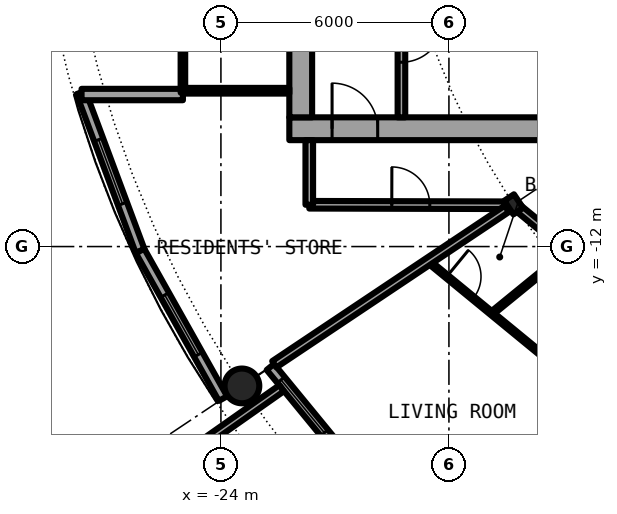
"""IFC4 building model, lengths in metres.
Left out: names, types, materials, properties, quantities, classifications, styles, units other than length and angle.
Written with IfcOpenShell. Run it as: python <this file> out.ifc"""

import sys

from ifc_helpers import new_model, si_unit, direction, frame, frame_2d, origin, origin_2d, place, context, subcontext, project, spatial, rectangle, hollow_circle, i_section, extrude, element, fill, save


model = new_model("IFC4")
c1 = context("Model", 3, precision=1e-05, world=origin(), true_north=direction((0.0, 1.0)))
c2 = subcontext(c1, "Body", "Model", "MODEL_VIEW")
j1 = project(units=[si_unit("LENGTHUNIT", "METRE"), si_unit("PLANEANGLEUNIT", "RADIAN")], contexts=[c1])
p1 = place(None, origin())
s1 = spatial("IfcSite", under=j1, at=p1, CompositionType="ELEMENT")
p2 = place(p1, origin())
s2 = spatial("IfcBuilding", under=s1, at=p2, CompositionType="ELEMENT")
p3 = place(p2, frame((0.0, 0.0, 129.95)))
s3 = spatial("IfcBuildingStorey", under=s2, at=p3, CompositionType="ELEMENT", Elevation=129.95)
p4 = place(p3, frame((-23.448, -15.667, 0.0), z_axis=(0.0, 0.0, 1.0), x_axis=(1.0, 0.0, 0.0)))
e1 = element("IfcColumn", 1, at=p4, inside=s3, PredefinedType="COLUMN", context=c2, shape_type="SweptSolid", body=[
    extrude(hollow_circle(Radius=0.457, WallThickness=0.04, at=origin_2d()), origin(), (0.0, 0.0, 1.0), 3.05),
])
p5 = place(p3, frame((-16.297, -10.889, 0.0), z_axis=(0.0, 0.0, 1.0), x_axis=(-0.831469612303, -0.55557023302, 0.0)))
e2 = element("IfcColumn", 2, at=p5, inside=s3, PredefinedType="COLUMN", context=c2, shape_type="SweptSolid", body=[
    extrude(i_section(OverallWidth=0.307, OverallDepth=0.432, WebThickness=0.021, FlangeThickness=0.04, FilletRadius=0.027, at=origin_2d()), origin(), (0.0, 0.0, 1.0), 3.05),
])
p6 = place(p3, frame((-22.699, -15.167, 0.0), z_axis=(0.0, 0.0, 1.0), x_axis=(0.634382322723, -0.773019449054, 0.0)))
e3 = element("IfcWall", 3, at=p6, inside=s3, PredefinedType="SOLIDWALL", context=c2, shape_type="SweptSolid", body=[
    extrude(rectangle(XDim=5.352, YDim=0.25, at=frame_2d((2.676, 0.0))), origin(), (0.0, 0.0, 1.0), 2.7),
])
p7 = place(p6, frame((0.441, 0.0, 0.3)))
e4 = element("IfcOpeningElement", 4, at=p7, cuts=e3, PredefinedType="OPENING", context=c2, shape_type="SweptSolid", body=[
    extrude(rectangle(XDim=1.8, YDim=2.1, at=frame_2d((0.9, 1.05))), frame((0.0, 0.135, 0.0), z_axis=(0.0, -1.0, 0.0), x_axis=(1.0, 0.0, 0.0)), (0.0, 0.0, 1.0), 0.27),
])
p8 = place(p6, frame((3.51, 0.0, 0.0)))
e5 = element("IfcOpeningElement", 5, at=p8, cuts=e3, PredefinedType="OPENING", context=c2, shape_type="SweptSolid", body=[
    extrude(rectangle(XDim=1.0, YDim=2.2, at=frame_2d((0.5, 1.1))), frame((0.0, 0.135, 0.0), z_axis=(0.0, -1.0, 0.0), x_axis=(1.0, 0.0, 0.0)), (0.0, 0.0, 1.0), 0.27),
])
p9 = place(p3, frame((-22.402, -15.726, -0.03), z_axis=(0.0, 0.0, 1.0), x_axis=(-0.818275399393, -0.574826383135, 0.0)))
e6 = element("IfcWall", 6, at=p9, inside=s3, PredefinedType="SOLIDWALL", context=c2, shape_type="SweptSolid", body=[
    extrude(rectangle(XDim=2.929, YDim=0.2, at=frame_2d((1.465, 0.0))), origin(), (0.0, 0.0, 1.0), 2.73),
])
p10 = place(p3, frame((-27.682, -7.945, 0.0), z_axis=(0.0, 0.0, 1.0), x_axis=(0.349247811493, -0.937030397675, 0.0)))
e7 = element("IfcWall", 7, at=p10, inside=s3, PredefinedType="SOLIDWALL", context=c2, shape_type="SweptSolid", body=[
    extrude(rectangle(XDim=4.452, YDim=0.25, at=frame_2d((2.226, 0.0))), origin(), (0.0, 0.0, 1.0), 2.7),
])
p11 = place(p10, frame((1.327, 0.0, 0.3)))
e8 = element("IfcOpeningElement", 8, at=p11, cuts=e7, PredefinedType="OPENING", context=c2, shape_type="SweptSolid", body=[
    extrude(rectangle(XDim=1.8, YDim=2.1, at=frame_2d((0.9, 1.05))), frame((0.0, 0.135, 0.0), z_axis=(0.0, -1.0, 0.0), x_axis=(1.0, 0.0, 0.0)), (0.0, 0.0, 1.0), 0.27),
])
p12 = place(p3, frame((-26.127, -12.117, 0.0), z_axis=(0.0, 0.0, 1.0), x_axis=(0.489696356642, -0.871893042919, 0.0)))
e9 = element("IfcWall", 9, at=p12, inside=s3, PredefinedType="SOLIDWALL", context=c2, shape_type="SweptSolid", body=[
    extrude(rectangle(XDim=4.454, YDim=0.25, at=frame_2d((2.227, 0.0))), origin(), (0.0, 0.0, 1.0), 2.7),
])
p13 = place(p12, frame((1.327, 0.0, 0.3)))
e10 = element("IfcOpeningElement", 10, at=p13, cuts=e9, PredefinedType="OPENING", context=c2, shape_type="SweptSolid", body=[
    extrude(rectangle(XDim=1.8, YDim=2.1, at=frame_2d((0.9, 1.05))), frame((0.0, 0.135, 0.0), z_axis=(0.0, -1.0, 0.0), x_axis=(1.0, 0.0, 0.0)), (0.0, 0.0, 1.0), 0.27),
])
p14 = place(p3, frame((-25.0, -8.0, 0.0), z_axis=(0.0, 0.0, 1.0), x_axis=(-1.0, 0.0, 0.0)))
e11 = element("IfcWall", 11, at=p14, inside=s3, PredefinedType="SOLIDWALL", context=c2, shape_type="SweptSolid", body=[
    extrude(rectangle(XDim=2.667, YDim=0.3, at=frame_2d((1.333, 0.0))), origin(), (0.0, 0.0, 1.0), 2.7),
])
p15 = place(p3, frame((-22.2, -8.9, 0.0), z_axis=(0.0, 0.0, 1.0), x_axis=(1.0, 0.0, 0.0)))
e12 = element("IfcWall", 12, at=p15, inside=s3, PredefinedType="SHEAR", context=c2, shape_type="SweptSolid", body=[
    extrude(rectangle(XDim=13.8, YDim=0.6, at=frame_2d((6.9, 0.0))), origin(), (0.0, 0.0, 1.0), 3.05),
])
p16 = place(p15, frame((1.125, 0.0, 0.0)))
e13 = element("IfcOpeningElement", 13, at=p16, cuts=e12, PredefinedType="OPENING", context=c2, shape_type="SweptSolid", body=[
    extrude(rectangle(XDim=1.2, YDim=2.3, at=frame_2d((0.6, 1.15))), frame((0.0, 0.31, 0.0), z_axis=(0.0, -1.0, 0.0), x_axis=(1.0, 0.0, 0.0)), (0.0, 0.0, 1.0), 0.62),
])
p17 = place(p3, frame((-21.9, -8.6, 0.0), z_axis=(0.0, 0.0, 1.0), x_axis=(0.0, 1.0, 0.0)))
e14 = element("IfcWall", 14, at=p17, inside=s3, PredefinedType="SHEAR", context=c2, shape_type="SweptSolid", body=[
    extrude(rectangle(XDim=17.2, YDim=0.6, at=frame_2d((8.6, 0.0))), origin(), (0.0, 0.0, 1.0), 3.05),
])
p18 = place(p17, frame((7.7, 0.0, 0.0)))
e15 = element("IfcOpeningElement", 15, at=p18, cuts=e14, PredefinedType="OPENING", context=c2, shape_type="SweptSolid", body=[
    extrude(rectangle(XDim=1.8, YDim=2.3, at=frame_2d((0.9, 1.15))), frame((0.0, 0.31, 0.0), z_axis=(0.0, -1.0, 0.0), x_axis=(1.0, 0.0, 0.0)), (0.0, 0.0, 1.0), 0.62),
])
p19 = place(p3, frame((-19.25, -1.575, 0.0), z_axis=(0.0, 0.0, 1.0), x_axis=(0.0, -1.0, 0.0)))
e16 = element("IfcWall", 16, at=p19, inside=s3, PredefinedType="SOLIDWALL", context=c2, shape_type="SweptSolid", body=[
    extrude(rectangle(XDim=7.025, YDim=0.2, at=frame_2d((3.513, 0.0))), origin(), (0.0, 0.0, 1.0), 2.7),
])
p20 = place(p19, frame((4.475, 0.0, 0.0)))
e17 = element("IfcOpeningElement", 17, at=p20, cuts=e16, PredefinedType="OPENING", context=c2, shape_type="SweptSolid", body=[
    extrude(rectangle(XDim=1.1, YDim=2.3, at=frame_2d((0.55, 1.15))), frame((0.0, 0.11, 0.0), z_axis=(0.0, -1.0, 0.0), x_axis=(1.0, 0.0, 0.0)), (0.0, 0.0, 1.0), 0.22),
])
p21 = place(p3, frame((-22.2, -7.9, 0.0), z_axis=(0.0, 0.0, 1.0), x_axis=(-1.0, 0.0, 0.0)))
e18 = element("IfcWall", 18, at=p21, inside=s3, PredefinedType="PARTITIONING", context=c2, shape_type="SweptSolid", body=[
    extrude(rectangle(XDim=2.74, YDim=0.15, at=frame_2d((1.37, 0.0))), origin(), (0.0, 0.0, 1.0), 2.7),
])
p22 = place(p3, frame((-25.0, 7.95, 0.0), z_axis=(0.0, 0.0, 1.0), x_axis=(0.0, -1.0, 0.0)))
e19 = element("IfcWall", 19, at=p22, inside=s3, PredefinedType="PARTITIONING", context=c2, shape_type="SweptSolid", body=[
    extrude(rectangle(XDim=15.9, YDim=0.12, at=frame_2d((7.95, 0.0))), origin(), (0.0, 0.0, 1.0), 2.7),
])
p23 = place(p22, frame((0.95, 0.0, 0.1)))
e20 = element("IfcOpeningElement", 20, at=p23, cuts=e19, PredefinedType="OPENING", context=c2, shape_type="SweptSolid", body=[
    extrude(rectangle(XDim=14.0, YDim=2.35, at=frame_2d((7.0, 1.175))), frame((0.0, 0.07, 0.0), z_axis=(0.0, -1.0, 0.0), x_axis=(1.0, 0.0, 0.0)), (0.0, 0.0, 1.0), 0.14),
])
p24 = place(p3, frame((-18.542, -12.389, 0.0), z_axis=(0.0, 0.0, 1.0), x_axis=(0.772975913823, -0.634435368379, 0.0)))
e21 = element("IfcWall", 21, at=p24, inside=s3, PredefinedType="PARTITIONING", context=c2, shape_type="SweptSolid", body=[
    extrude(rectangle(XDim=4.316, YDim=0.1, at=frame_2d((2.158, 0.0))), origin(), (0.0, 0.0, 1.0), 2.7),
])
p25 = place(p24, frame((0.629, 0.0, 0.0)))
e22 = element("IfcOpeningElement", 22, at=p25, cuts=e21, PredefinedType="OPENING", context=c2, shape_type="SweptSolid", body=[
    extrude(rectangle(XDim=0.9, YDim=2.3, at=frame_2d((0.45, 1.15))), frame((0.0, 0.06, 0.0), z_axis=(0.0, -1.0, 0.0), x_axis=(1.0, 0.0, 0.0)), (0.0, 0.0, 1.0), 0.12),
])
p26 = place(p3, frame((-16.173, -10.991, 0.0), z_axis=(0.0, 0.0, 1.0), x_axis=(0.773013989296, -0.634388975591, 0.0)))
e23 = element("IfcWall", 23, at=p26, inside=s3, PredefinedType="PARTITIONING", context=c2, shape_type="SweptSolid", body=[
    extrude(rectangle(XDim=11.219, YDim=0.2, at=frame_2d((5.609, 0.0))), origin(), (0.0, 0.0, 1.0), 2.39),
])
p27 = place(p26, frame((4.089, 0.0, 0.0)))
e24 = element("IfcOpeningElement", 24, at=p27, cuts=e23, PredefinedType="OPENING", context=c2, shape_type="SweptSolid", body=[
    extrude(rectangle(XDim=1.0, YDim=2.3, at=frame_2d((0.5, 1.15))), frame((0.0, 0.11, 0.0), z_axis=(0.0, -1.0, 0.0), x_axis=(1.0, 0.0, 0.0)), (0.0, 0.0, 1.0), 0.22),
])
p28 = place(p3, frame((-21.675, -10.9, 0.0), z_axis=(0.0, 0.0, 1.0), x_axis=(0.99999670426, -0.002567385634, 0.0)))
e25 = element("IfcWall", 25, at=p28, inside=s3, PredefinedType="PARTITIONING", context=c2, shape_type="SweptSolid", body=[
    extrude(rectangle(XDim=5.135, YDim=0.2, at=frame_2d((2.567, 0.0))), origin(), (0.0, 0.0, 1.0), 2.7),
])
p29 = place(p28, frame((2.171, 0.0, 0.0)))
e26 = element("IfcOpeningElement", 26, at=p29, cuts=e25, PredefinedType="OPENING", context=c2, shape_type="SweptSolid", body=[
    extrude(rectangle(XDim=1.0, YDim=2.3, at=frame_2d((0.5, 1.15))), frame((0.0, 0.11, 0.0), z_axis=(0.0, -1.0, 0.0), x_axis=(1.0, 0.0, 0.0)), (0.0, 0.0, 1.0), 0.22),
])
p30 = place(p3, frame((-22.595, -15.097, 0.0), z_axis=(0.0, 0.0, 1.0), x_axis=(0.831467903109, 0.555572791, 0.0)))
e27 = element("IfcWall", 27, at=p30, inside=s3, PredefinedType="PARTITIONING", context=c2, shape_type="SweptSolid", body=[
    extrude(rectangle(XDim=7.358, YDim=0.2, at=frame_2d((3.679, 0.0))), origin(), (0.0, 0.0, 1.0), 2.7),
])
p31 = place(p3, frame((-17.24, -21.007, 0.0), z_axis=(0.0, 0.0, 1.0), x_axis=(0.634396151441, 0.77300810024, 0.0)))
e28 = element("IfcWall", 28, at=p31, inside=s3, PredefinedType="PARTITIONING", context=c2, shape_type="SweptSolid", body=[
    extrude(rectangle(XDim=8.419, YDim=0.1, at=frame_2d((4.209, 0.0))), origin(), (0.0, 0.0, 1.0), 2.7),
])
p32 = place(p31, frame((6.679, 0.0, 0.0)))
e29 = element("IfcOpeningElement", 29, at=p32, cuts=e28, PredefinedType="OPENING", context=c2, shape_type="SweptSolid", body=[
    extrude(rectangle(XDim=0.9, YDim=2.3, at=frame_2d((0.45, 1.15))), frame((0.0, 0.06, 0.0), z_axis=(0.0, -1.0, 0.0), x_axis=(1.0, 0.0, 0.0)), (0.0, 0.0, 1.0), 0.12),
])
p33 = place(p31, frame((2.468, 0.0, 0.0)))
e30 = element("IfcOpeningElement", 30, at=p33, cuts=e28, PredefinedType="OPENING", context=c2, shape_type="SweptSolid", body=[
    extrude(rectangle(XDim=0.9, YDim=2.3, at=frame_2d((0.45, 1.15))), frame((0.0, 0.06, 0.0), z_axis=(0.0, -1.0, 0.0), x_axis=(1.0, 0.0, 0.0)), (0.0, 0.0, 1.0), 0.12),
])
p34 = place(p3, frame((-16.874, -13.758, 0.0), z_axis=(0.0, 0.0, 1.0), x_axis=(0.774979608522, 0.631986239072, 0.0)))
e31 = element("IfcWall", 31, at=p34, inside=s3, PredefinedType="PARTITIONING", context=c2, shape_type="SweptSolid", body=[
    extrude(rectangle(XDim=2.636, YDim=0.1, at=frame_2d((1.318, 0.0))), origin(), (0.0, 0.0, 1.0), 2.7),
])
p35 = place(p3, frame((-21.675, -10.9, 0.0), z_axis=(0.0, 0.0, 1.0), x_axis=(0.0, 1.0, 0.0)))
e32 = element("IfcWall", 32, at=p35, inside=s3, PredefinedType="PARTITIONING", context=c2, shape_type="SweptSolid", body=[
    extrude(rectangle(XDim=1.7, YDim=0.2, at=frame_2d((0.85, 0.0))), origin(), (0.0, 0.0, 1.0), 2.7),
])
p36 = place(p7, origin())
e33 = element("IfcWindow", 33, at=p36, inside=s3, PartitioningType="SINGLE_PANEL", PredefinedType="WINDOW", context=c2, shape_type="SweptSolid", body=[
    extrude(rectangle(XDim=1.8, YDim=2.1, at=frame_2d((0.9, 1.05))), frame((0.0, 0.03, 0.0), z_axis=(0.0, -1.0, 0.0), x_axis=(1.0, 0.0, 0.0)), (0.0, 0.0, 1.0), 0.06),
])
fill(e4, e33)
p37 = place(p11, origin())
e34 = element("IfcWindow", 34, at=p37, inside=s3, PartitioningType="SINGLE_PANEL", PredefinedType="WINDOW", context=c2, shape_type="SweptSolid", body=[
    extrude(rectangle(XDim=1.8, YDim=2.1, at=frame_2d((0.9, 1.05))), frame((0.0, 0.03, 0.0), z_axis=(0.0, -1.0, 0.0), x_axis=(1.0, 0.0, 0.0)), (0.0, 0.0, 1.0), 0.06),
])
fill(e8, e34)
p38 = place(p13, origin())
e35 = element("IfcWindow", 35, at=p38, inside=s3, PartitioningType="SINGLE_PANEL", PredefinedType="WINDOW", context=c2, shape_type="SweptSolid", body=[
    extrude(rectangle(XDim=1.8, YDim=2.1, at=frame_2d((0.9, 1.05))), frame((0.0, 0.03, 0.0), z_axis=(0.0, -1.0, 0.0), x_axis=(1.0, 0.0, 0.0)), (0.0, 0.0, 1.0), 0.06),
])
fill(e10, e35)
p39 = place(p20, origin())
e36 = element("IfcDoor", 36, at=p39, inside=s3, OperationType="SINGLE_SWING_LEFT", PredefinedType="DOOR", context=c2, shape_type="SweptSolid", body=[
    extrude(rectangle(XDim=1.1, YDim=2.3, at=frame_2d((0.55, 1.15))), frame((0.0, 0.025, 0.0), z_axis=(0.0, -1.0, 0.0), x_axis=(1.0, 0.0, 0.0)), (0.0, 0.0, 1.0), 0.05),
])
fill(e17, e36)
p40 = place(p16, origin())
e37 = element("IfcDoor", 37, at=p40, inside=s3, OperationType="SINGLE_SWING_RIGHT", PredefinedType="DOOR", context=c2, shape_type="SweptSolid", body=[
    extrude(rectangle(XDim=1.2, YDim=2.3, at=frame_2d((0.6, 1.15))), frame((0.0, 0.025, 0.0), z_axis=(0.0, -1.0, 0.0), x_axis=(1.0, 0.0, 0.0)), (0.0, 0.0, 1.0), 0.05),
])
fill(e13, e37)
p41 = place(p23, origin())
e38 = element("IfcWindow", 38, at=p41, inside=s3, PartitioningType="SINGLE_PANEL", PredefinedType="WINDOW", context=c2, shape_type="SweptSolid", body=[
    extrude(rectangle(XDim=14.0, YDim=2.35, at=frame_2d((7.0, 1.175))), frame((0.0, 0.03, 0.0), z_axis=(0.0, -1.0, 0.0), x_axis=(1.0, 0.0, 0.0)), (0.0, 0.0, 1.0), 0.06),
])
fill(e20, e38)
p42 = place(p25, origin())
e39 = element("IfcDoor", 39, at=p42, inside=s3, OperationType="SINGLE_SWING_LEFT", PredefinedType="DOOR", context=c2, shape_type="SweptSolid", body=[
    extrude(rectangle(XDim=0.9, YDim=2.3, at=frame_2d((0.45, 1.15))), frame((0.0, 0.025, 0.0), z_axis=(0.0, -1.0, 0.0), x_axis=(1.0, 0.0, 0.0)), (0.0, 0.0, 1.0), 0.05),
])
fill(e22, e39)
p43 = place(p29, origin())
e40 = element("IfcDoor", 40, at=p43, inside=s3, OperationType="SINGLE_SWING_RIGHT", PredefinedType="DOOR", context=c2, shape_type="SweptSolid", body=[
    extrude(rectangle(XDim=1.0, YDim=2.3, at=frame_2d((0.5, 1.15))), frame((0.0, 0.025, 0.0), z_axis=(0.0, -1.0, 0.0), x_axis=(1.0, 0.0, 0.0)), (0.0, 0.0, 1.0), 0.05),
])
fill(e26, e40)
save(model, sys.argv[1])
